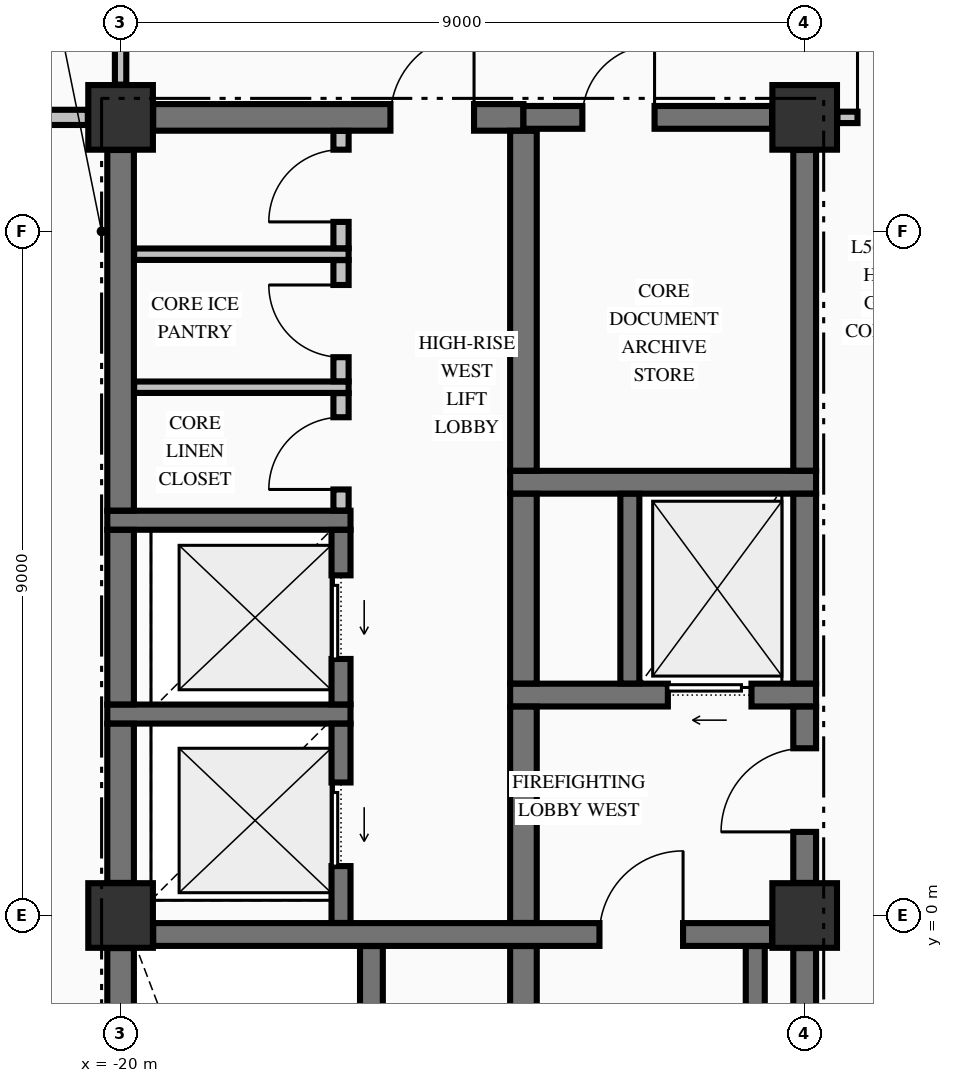
"""IFC4 building model, lengths in metres.
Left out: names, types, materials, properties, quantities, classifications, styles, units other than length and angle.
Written with IfcOpenShell. Run it as: python <this file> out.ifc"""

import sys

from ifc_helpers import new_model, si_unit, direction, frame, frame_2d, origin, origin_2d, place, context, subcontext, project, spatial, rectangle, extrude, element, fill, save


model = new_model("IFC4")
c1 = context("Model", 3, precision=1e-05, world=origin(), true_north=direction((0.0, 1.0)))
c2 = subcontext(c1, "Body", "Model", "MODEL_VIEW")
j1 = project(units=[si_unit("LENGTHUNIT", "METRE"), si_unit("PLANEANGLEUNIT", "RADIAN")], contexts=[c1])
p1 = place(None, origin())
s1 = spatial("IfcSite", under=j1, at=p1, CompositionType="ELEMENT")
p2 = place(p1, origin())
s2 = spatial("IfcBuilding", under=s1, at=p2, CompositionType="ELEMENT")
p3 = place(p2, frame((0.0, 0.0, 215.26)))
s3 = spatial("IfcBuildingStorey", under=s2, at=p3, CompositionType="ELEMENT", Elevation=215.26)
for number, where, z_axis, x_axis in (
    (1, (-20.0, 10.5, -0.25), (0.0, 0.0, 1.0), (1.0, 0.0, 0.0)),
    (2, (-11.0, 0.0, -0.25), (0.0, 0.0, 1.0), (1.0, 0.0, 0.0)),
    (3, (-11.0, 10.5, -0.25), (0.0, 0.0, 1.0), (1.0, 0.0, 0.0)),
    (4, (-20.0, 0.0, -0.25), (0.0, 0.0, 1.0), (1.0, 0.0, 0.0)),
):
    element("IfcColumn", number, at=place(p3, frame(where, z_axis=z_axis, x_axis=x_axis)), inside=s3, PredefinedType="COLUMN", context=c2, shape_type="SweptSolid", body=[
        extrude(rectangle(XDim=0.85, YDim=0.85, at=origin_2d()), origin(), (0.0, 0.0, 1.0), 3.4),
    ])
p4 = place(p3, frame((-19.571, -0.25, 0.0), z_axis=(0.0, 0.0, 1.0), x_axis=(1.0, 0.0, 0.0)))
e5 = element("IfcWall", 5, at=p4, inside=s3, PredefinedType="SHEAR", context=c2, shape_type="SweptSolid", body=[
    extrude(rectangle(XDim=8.142, YDim=0.3, at=frame_2d((4.071, 0.0))), origin(), (0.0, 0.0, 1.0), 3.15),
])
p5 = place(p4, frame((5.871, 0.0, 0.0)))
e6 = element("IfcOpeningElement", 6, at=p5, cuts=e5, PredefinedType="OPENING", context=c2, shape_type="SweptSolid", body=[
    extrude(rectangle(XDim=1.1, YDim=2.15, at=frame_2d((0.55, 1.075))), frame((0.0, 0.16, 0.0), z_axis=(0.0, -1.0, 0.0), x_axis=(1.0, 0.0, 0.0)), (0.0, 0.0, 1.0), 0.32),
])
p6 = place(p3, frame((-20.175, 2.65, 0.0), z_axis=(0.0, 0.0, 1.0), x_axis=(1.0, 0.0, 0.0)))
e7 = element("IfcWall", 7, at=p6, inside=s3, PredefinedType="SOLIDWALL", context=c2, shape_type="SweptSolid", body=[
    extrude(rectangle(XDim=3.2, YDim=0.25, at=frame_2d((1.6, 0.0))), origin(), (0.0, 0.0, 1.0), 3.15),
])
p7 = place(p3, frame((-14.875, 2.9, 0.0), z_axis=(0.0, 0.0, 1.0), x_axis=(1.0, 0.0, 0.0)))
e8 = element("IfcWall", 8, at=p7, inside=s3, PredefinedType="SHEAR", context=c2, shape_type="SweptSolid", body=[
    extrude(rectangle(XDim=4.025, YDim=0.3, at=frame_2d((2.012, 0.0))), origin(), (0.0, 0.0, 1.0), 3.15),
])
p8 = place(p7, frame((2.075, 0.0, 0.0)))
e9 = element("IfcOpeningElement", 9, at=p8, cuts=e8, PredefinedType="OPENING", context=c2, shape_type="SweptSolid", body=[
    extrude(rectangle(XDim=1.1, YDim=2.2, at=frame_2d((0.55, 1.1))), frame((0.0, 0.16, 0.0), z_axis=(0.0, -1.0, 0.0), x_axis=(1.0, 0.0, 0.0)), (0.0, 0.0, 1.0), 0.32),
])
p9 = place(p3, frame((-20.175, 5.2, 0.0), z_axis=(0.0, 0.0, 1.0), x_axis=(1.0, 0.0, 0.0)))
e10 = element("IfcWall", 10, at=p9, inside=s3, PredefinedType="SOLIDWALL", context=c2, shape_type="SweptSolid", body=[
    extrude(rectangle(XDim=3.2, YDim=0.25, at=frame_2d((1.6, 0.0))), origin(), (0.0, 0.0, 1.0), 3.15),
])
p10 = place(p3, frame((-14.875, 5.7, 0.0), z_axis=(0.0, 0.0, 1.0), x_axis=(1.0, 0.0, 0.0)))
e11 = element("IfcWall", 11, at=p10, inside=s3, PredefinedType="SHEAR", context=c2, shape_type="SweptSolid", body=[
    extrude(rectangle(XDim=4.025, YDim=0.3, at=frame_2d((2.012, 0.0))), origin(), (0.0, 0.0, 1.0), 3.15),
])
p11 = place(p3, frame((-19.571, 10.5, 0.0), z_axis=(0.0, 0.0, 1.0), x_axis=(1.0, 0.0, 0.0)))
e12 = element("IfcWall", 12, at=p11, inside=s3, PredefinedType="SHEAR", context=c2, shape_type="SweptSolid", body=[
    extrude(rectangle(XDim=4.871, YDim=0.35, at=frame_2d((2.436, 0.0))), origin(), (0.0, 0.0, 1.0), 3.15),
])
p12 = place(p11, frame((3.121, 0.0, 0.0)))
e13 = element("IfcOpeningElement", 13, at=p12, cuts=e12, PredefinedType="OPENING", context=c2, shape_type="SweptSolid", body=[
    extrude(rectangle(XDim=1.1, YDim=2.15, at=frame_2d((0.55, 1.075))), frame((0.0, 0.185, 0.0), z_axis=(0.0, -1.0, 0.0), x_axis=(1.0, 0.0, 0.0)), (0.0, 0.0, 1.0), 0.37),
])
p13 = place(p3, frame((-14.7, 10.5, 0.0), z_axis=(0.0, 0.0, 1.0), x_axis=(1.0, 0.0, 0.0)))
e14 = element("IfcWall", 14, at=p13, inside=s3, PredefinedType="SHEAR", context=c2, shape_type="SweptSolid", body=[
    extrude(rectangle(XDim=3.271, YDim=0.3, at=frame_2d((1.635, 0.0))), origin(), (0.0, 0.0, 1.0), 3.15),
])
p14 = place(p13, frame((0.775, 0.0, 0.0)))
e15 = element("IfcOpeningElement", 15, at=p14, cuts=e14, PredefinedType="OPENING", context=c2, shape_type="SweptSolid", body=[
    extrude(rectangle(XDim=0.95, YDim=2.15, at=frame_2d((0.475, 1.075))), frame((0.0, 0.16, 0.0), z_axis=(0.0, -1.0, 0.0), x_axis=(1.0, 0.0, 0.0)), (0.0, 0.0, 1.0), 0.32),
])
for number, where, z_axis, x_axis in (
    (16, (-19.822, 6.95, 0.0), (0.0, 0.0, 1.0), (1.0, 0.0, 0.0)),
    (17, (-19.822, 8.7, 0.0), (0.0, 0.0, 1.0), (1.0, 0.0, 0.0)),
):
    element("IfcWall", number, at=place(p3, frame(where, z_axis=z_axis, x_axis=x_axis)), inside=s3, PredefinedType="PARTITIONING", context=c2, shape_type="SweptSolid", body=[
        extrude(rectangle(XDim=2.822, YDim=0.15, at=frame_2d((1.411, 0.0))), origin(), (0.0, 0.0, 1.0), 3.15),
    ])
p15 = place(p3, frame((-26.835, 10.5, 0.0), z_axis=(0.0, 0.0, 1.0), x_axis=(1.0, 0.0, 0.0)))
e18 = element("IfcWall", 18, at=p15, inside=s3, PredefinedType="PARTITIONING", context=c2, shape_type="SweptSolid", body=[
    extrude(rectangle(XDim=6.404, YDim=0.2, at=frame_2d((3.202, 0.0))), origin(), (0.0, 0.0, 1.0), 3.15),
])
p16 = place(p15, frame((2.86, 0.0, 0.0)))
e19 = element("IfcOpeningElement", 19, at=p16, cuts=e18, PredefinedType="OPENING", context=c2, shape_type="SweptSolid", body=[
    extrude(rectangle(XDim=0.95, YDim=2.15, at=frame_2d((0.475, 1.075))), frame((0.0, 0.11, 0.0), z_axis=(0.0, -1.0, 0.0), x_axis=(1.0, 0.0, 0.0)), (0.0, 0.0, 1.0), 0.22),
])
p17 = place(p3, frame((-10.569, 10.5, 0.0), z_axis=(0.0, 0.0, 1.0), x_axis=(1.0, 0.0, 0.0)))
e20 = element("IfcWall", 20, at=p17, inside=s3, PredefinedType="PARTITIONING", context=c2, shape_type="SweptSolid", body=[
    extrude(rectangle(XDim=21.138, YDim=0.15, at=frame_2d((10.569, 0.0))), origin(), (0.0, 0.0, 1.0), 3.15),
])
p18 = place(p17, frame((0.264, 0.0, 0.0)))
e21 = element("IfcOpeningElement", 21, at=p18, cuts=e20, PredefinedType="OPENING", context=c2, shape_type="SweptSolid", body=[
    extrude(rectangle(XDim=1.05, YDim=2.15, at=frame_2d((0.525, 1.075))), frame((0.0, 0.085, 0.0), z_axis=(0.0, -1.0, 0.0), x_axis=(1.0, 0.0, 0.0)), (0.0, 0.0, 1.0), 0.17),
])
p19 = place(p17, frame((19.824, 0.0, 0.0)))
e22 = element("IfcOpeningElement", 22, at=p19, cuts=e20, PredefinedType="OPENING", context=c2, shape_type="SweptSolid", body=[
    extrude(rectangle(XDim=1.05, YDim=2.15, at=frame_2d((0.525, 1.075))), frame((0.0, 0.085, 0.0), z_axis=(0.0, -1.0, 0.0), x_axis=(1.0, 0.0, 0.0)), (0.0, 0.0, 1.0), 0.17),
])
p20 = place(p3, frame((-20.0, -9.521, 0.0), z_axis=(0.0, 0.0, 1.0), x_axis=(0.0, 1.0, 0.0)))
e23 = element("IfcWall", 23, at=p20, inside=s3, PredefinedType="SHEAR", context=c2, shape_type="SweptSolid", body=[
    extrude(rectangle(XDim=9.092, YDim=0.35, at=frame_2d((4.546, 0.0))), origin(), (0.0, 0.0, 1.0), 3.15),
])
p21 = place(p3, frame((-20.0, 0.429, 0.0), z_axis=(0.0, 0.0, 1.0), x_axis=(0.0, 1.0, 0.0)))
e24 = element("IfcWall", 24, at=p21, inside=s3, PredefinedType="SHEAR", context=c2, shape_type="SweptSolid", body=[
    extrude(rectangle(XDim=2.094, YDim=0.35, at=frame_2d((1.047, 0.0))), origin(), (0.0, 0.0, 1.0), 3.15),
])
p22 = place(p3, frame((-20.0, 2.777, 0.0), z_axis=(0.0, 0.0, 1.0), x_axis=(0.0, 1.0, 0.0)))
e25 = element("IfcWall", 25, at=p22, inside=s3, PredefinedType="SHEAR", context=c2, shape_type="SweptSolid", body=[
    extrude(rectangle(XDim=2.296, YDim=0.35, at=frame_2d((1.148, 0.0))), origin(), (0.0, 0.0, 1.0), 3.15),
])
p23 = place(p3, frame((-20.0, 5.327, 0.0), z_axis=(0.0, 0.0, 1.0), x_axis=(0.0, 1.0, 0.0)))
e26 = element("IfcWall", 26, at=p23, inside=s3, PredefinedType="SHEAR", context=c2, shape_type="SweptSolid", body=[
    extrude(rectangle(XDim=4.744, YDim=0.35, at=frame_2d((2.372, 0.0))), origin(), (0.0, 0.0, 1.0), 3.15),
])
p24 = place(p3, frame((-17.1, -0.098, 0.0), z_axis=(0.0, 0.0, 1.0), x_axis=(0.0, 1.0, 0.0)))
e27 = element("IfcWall", 27, at=p24, inside=s3, PredefinedType="SOLIDWALL", context=c2, shape_type="SweptSolid", body=[
    extrude(rectangle(XDim=2.621, YDim=0.25, at=frame_2d((1.311, 0.0))), origin(), (0.0, 0.0, 1.0), 3.15),
])
p25 = place(p24, frame((0.748, 0.0, 0.0)))
e28 = element("IfcOpeningElement", 28, at=p25, cuts=e27, PredefinedType="OPENING", context=c2, shape_type="SweptSolid", body=[
    extrude(rectangle(XDim=1.1, YDim=2.2, at=frame_2d((0.55, 1.1))), frame((0.0, 0.135, 0.0), z_axis=(0.0, -1.0, 0.0), x_axis=(1.0, 0.0, 0.0)), (0.0, 0.0, 1.0), 0.27),
])
p26 = place(p3, frame((-17.1, 2.777, 0.0), z_axis=(0.0, 0.0, 1.0), x_axis=(0.0, 1.0, 0.0)))
e29 = element("IfcWall", 29, at=p26, inside=s3, PredefinedType="SOLIDWALL", context=c2, shape_type="SweptSolid", body=[
    extrude(rectangle(XDim=2.296, YDim=0.25, at=frame_2d((1.148, 0.0))), origin(), (0.0, 0.0, 1.0), 3.15),
])
p27 = place(p26, frame((0.598, 0.0, 0.0)))
e30 = element("IfcOpeningElement", 30, at=p27, cuts=e29, PredefinedType="OPENING", context=c2, shape_type="SweptSolid", body=[
    extrude(rectangle(XDim=1.1, YDim=2.2, at=frame_2d((0.55, 1.1))), frame((0.0, 0.135, 0.0), z_axis=(0.0, -1.0, 0.0), x_axis=(1.0, 0.0, 0.0)), (0.0, 0.0, 1.0), 0.27),
])
p28 = place(p3, frame((-16.7, -9.773, 0.0), z_axis=(0.0, 0.0, 1.0), x_axis=(0.0, 1.0, 0.0)))
e31 = element("IfcWall", 31, at=p28, inside=s3, PredefinedType="SHEAR", context=c2, shape_type="SweptSolid", body=[
    extrude(rectangle(XDim=9.371, YDim=0.3, at=frame_2d((4.686, 0.0))), origin(), (0.0, 0.0, 1.0), 3.15),
])
p29 = place(p3, frame((-14.7, -9.773, 0.0), z_axis=(0.0, 0.0, 1.0), x_axis=(0.0, 1.0, 0.0)))
e32 = element("IfcWall", 32, at=p29, inside=s3, PredefinedType="SHEAR", context=c2, shape_type="SweptSolid", body=[
    extrude(rectangle(XDim=9.371, YDim=0.35, at=frame_2d((4.686, 0.0))), origin(), (0.0, 0.0, 1.0), 3.15),
])
p30 = place(p3, frame((-14.7, -0.098, 0.0), z_axis=(0.0, 0.0, 1.0), x_axis=(0.0, 1.0, 0.0)))
e33 = element("IfcWall", 33, at=p30, inside=s3, PredefinedType="SHEAR", context=c2, shape_type="SweptSolid", body=[
    extrude(rectangle(XDim=2.846, YDim=0.35, at=frame_2d((1.423, 0.0))), origin(), (0.0, 0.0, 1.0), 3.15),
])
p31 = place(p3, frame((-14.7, 3.052, 0.0), z_axis=(0.0, 0.0, 1.0), x_axis=(0.0, 1.0, 0.0)))
e34 = element("IfcWall", 34, at=p31, inside=s3, PredefinedType="SHEAR", context=c2, shape_type="SweptSolid", body=[
    extrude(rectangle(XDim=2.496, YDim=0.35, at=frame_2d((1.248, 0.0))), origin(), (0.0, 0.0, 1.0), 3.15),
])
p32 = place(p3, frame((-14.7, 5.852, 0.0), z_axis=(0.0, 0.0, 1.0), x_axis=(0.0, 1.0, 0.0)))
e35 = element("IfcWall", 35, at=p32, inside=s3, PredefinedType="SHEAR", context=c2, shape_type="SweptSolid", body=[
    extrude(rectangle(XDim=4.471, YDim=0.35, at=frame_2d((2.235, 0.0))), origin(), (0.0, 0.0, 1.0), 3.15),
])
p33 = place(p3, frame((-13.3, 3.052, 0.0), z_axis=(0.0, 0.0, 1.0), x_axis=(0.0, 1.0, 0.0)))
e36 = element("IfcWall", 36, at=p33, inside=s3, PredefinedType="SOLIDWALL", context=c2, shape_type="SweptSolid", body=[
    extrude(rectangle(XDim=2.496, YDim=0.25, at=frame_2d((1.248, 0.0))), origin(), (0.0, 0.0, 1.0), 3.15),
])
p34 = place(p3, frame((-11.65, -9.798, 0.0), z_axis=(0.0, 0.0, 1.0), x_axis=(0.0, 1.0, 0.0)))
e37 = element("IfcWall", 37, at=p34, inside=s3, PredefinedType="SOLIDWALL", context=c2, shape_type="SweptSolid", body=[
    extrude(rectangle(XDim=9.396, YDim=0.25, at=frame_2d((4.698, 0.0))), origin(), (0.0, 0.0, 1.0), 3.15),
])
p35 = place(p3, frame((-11.0, -9.521, 0.0), z_axis=(0.0, 0.0, 1.0), x_axis=(0.0, 1.0, 0.0)))
e38 = element("IfcWall", 38, at=p35, inside=s3, PredefinedType="SHEAR", context=c2, shape_type="SweptSolid", body=[
    extrude(rectangle(XDim=9.092, YDim=0.3, at=frame_2d((4.546, 0.0))), origin(), (0.0, 0.0, 1.0), 3.15),
])
p36 = place(p3, frame((-11.0, 0.429, 0.0), z_axis=(0.0, 0.0, 1.0), x_axis=(0.0, 1.0, 0.0)))
e39 = element("IfcWall", 39, at=p36, inside=s3, PredefinedType="SHEAR", context=c2, shape_type="SweptSolid", body=[
    extrude(rectangle(XDim=2.319, YDim=0.3, at=frame_2d((1.16, 0.0))), origin(), (0.0, 0.0, 1.0), 3.15),
])
p37 = place(p36, frame((0.671, 0.0, 0.0)))
e40 = element("IfcOpeningElement", 40, at=p37, cuts=e39, PredefinedType="OPENING", context=c2, shape_type="SweptSolid", body=[
    extrude(rectangle(XDim=1.1, YDim=2.15, at=frame_2d((0.55, 1.075))), frame((0.0, 0.16, 0.0), z_axis=(0.0, -1.0, 0.0), x_axis=(1.0, 0.0, 0.0)), (0.0, 0.0, 1.0), 0.32),
])
p38 = place(p3, frame((-11.0, 3.052, 0.0), z_axis=(0.0, 0.0, 1.0), x_axis=(0.0, 1.0, 0.0)))
e41 = element("IfcWall", 41, at=p38, inside=s3, PredefinedType="SHEAR", context=c2, shape_type="SweptSolid", body=[
    extrude(rectangle(XDim=2.496, YDim=0.3, at=frame_2d((1.248, 0.0))), origin(), (0.0, 0.0, 1.0), 3.15),
])
p39 = place(p3, frame((-11.0, 5.852, 0.0), z_axis=(0.0, 0.0, 1.0), x_axis=(0.0, 1.0, 0.0)))
e42 = element("IfcWall", 42, at=p39, inside=s3, PredefinedType="SHEAR", context=c2, shape_type="SweptSolid", body=[
    extrude(rectangle(XDim=4.219, YDim=0.3, at=frame_2d((2.109, 0.0))), origin(), (0.0, 0.0, 1.0), 3.15),
])
p40 = place(p3, frame((-20.0, 10.931, 0.0), z_axis=(0.0, 0.0, 1.0), x_axis=(0.0, 1.0, 0.0)))
e43 = element("IfcWall", 43, at=p40, inside=s3, PredefinedType="PARTITIONING", context=c2, shape_type="SweptSolid", body=[
    extrude(rectangle(XDim=2.316, YDim=0.15, at=frame_2d((1.158, 0.0))), origin(), (0.0, 0.0, 1.0), 2.342),
])
p41 = place(p40, frame((0.524, 0.0, 0.0)))
e44 = element("IfcOpeningElement", 44, at=p41, cuts=e43, PredefinedType="OPENING", context=c2, shape_type="SweptSolid", body=[
    extrude(rectangle(XDim=0.95, YDim=2.15, at=frame_2d((0.475, 1.075))), frame((0.0, 0.085, 0.0), z_axis=(0.0, -1.0, 0.0), x_axis=(1.0, 0.0, 0.0)), (0.0, 0.0, 1.0), 0.17),
])
p42 = place(p3, frame((-17.1, 5.328, 0.0), z_axis=(0.0, 0.0, 1.0), x_axis=(0.0, 1.0, 0.0)))
e45 = element("IfcWall", 45, at=p42, inside=s3, PredefinedType="PARTITIONING", context=c2, shape_type="SweptSolid", body=[
    extrude(rectangle(XDim=1.544, YDim=0.2, at=frame_2d((0.772, 0.0))), origin(), (0.0, 0.0, 1.0), 3.15),
])
p43 = place(p42, frame((0.277, 0.0, 0.0)))
e46 = element("IfcOpeningElement", 46, at=p43, cuts=e45, PredefinedType="OPENING", context=c2, shape_type="SweptSolid", body=[
    extrude(rectangle(XDim=0.95, YDim=2.15, at=frame_2d((0.475, 1.075))), frame((0.0, 0.11, 0.0), z_axis=(0.0, -1.0, 0.0), x_axis=(1.0, 0.0, 0.0)), (0.0, 0.0, 1.0), 0.22),
])
p44 = place(p3, frame((-17.1, 7.028, 0.0), z_axis=(0.0, 0.0, 1.0), x_axis=(0.0, 1.0, 0.0)))
e47 = element("IfcWall", 47, at=p44, inside=s3, PredefinedType="PARTITIONING", context=c2, shape_type="SweptSolid", body=[
    extrude(rectangle(XDim=1.594, YDim=0.2, at=frame_2d((0.797, 0.0))), origin(), (0.0, 0.0, 1.0), 3.15),
])
p45 = place(p44, frame((0.317, 0.0, 0.0)))
e48 = element("IfcOpeningElement", 48, at=p45, cuts=e47, PredefinedType="OPENING", context=c2, shape_type="SweptSolid", body=[
    extrude(rectangle(XDim=0.95, YDim=2.15, at=frame_2d((0.475, 1.075))), frame((0.0, 0.11, 0.0), z_axis=(0.0, -1.0, 0.0), x_axis=(1.0, 0.0, 0.0)), (0.0, 0.0, 1.0), 0.22),
])
p46 = place(p3, frame((-17.1, 8.778, 0.0), z_axis=(0.0, 0.0, 1.0), x_axis=(0.0, 1.0, 0.0)))
e49 = element("IfcWall", 49, at=p46, inside=s3, PredefinedType="PARTITIONING", context=c2, shape_type="SweptSolid", body=[
    extrude(rectangle(XDim=1.544, YDim=0.2, at=frame_2d((0.772, 0.0))), origin(), (0.0, 0.0, 1.0), 3.15),
])
p47 = place(p46, frame((0.347, 0.0, 0.0)))
e50 = element("IfcOpeningElement", 50, at=p47, cuts=e49, PredefinedType="OPENING", context=c2, shape_type="SweptSolid", body=[
    extrude(rectangle(XDim=0.95, YDim=2.15, at=frame_2d((0.475, 1.075))), frame((0.0, 0.11, 0.0), z_axis=(0.0, -1.0, 0.0), x_axis=(1.0, 0.0, 0.0)), (0.0, 0.0, 1.0), 0.22),
])
p48 = place(p5, origin())
e51 = element("IfcDoor", 51, at=p48, inside=s3, OperationType="SINGLE_SWING_RIGHT", PredefinedType="DOOR", context=c2, shape_type="SweptSolid", body=[
    extrude(rectangle(XDim=1.1, YDim=2.15, at=frame_2d((0.55, 1.075))), frame((0.0, 0.025, 0.0), z_axis=(0.0, -1.0, 0.0), x_axis=(1.0, 0.0, 0.0)), (0.0, 0.0, 1.0), 0.05),
])
fill(e6, e51)
p49 = place(p37, origin())
e52 = element("IfcDoor", 52, at=p49, inside=s3, OperationType="SINGLE_SWING_LEFT", PredefinedType="DOOR", context=c2, shape_type="SweptSolid", body=[
    extrude(rectangle(XDim=1.1, YDim=2.15, at=frame_2d((0.55, 1.075))), frame((0.0, 0.025, 0.0), z_axis=(0.0, -1.0, 0.0), x_axis=(1.0, 0.0, 0.0)), (0.0, 0.0, 1.0), 0.05),
])
fill(e40, e52)
p50 = place(p8, origin())
e53 = element("IfcDoor", 53, at=p50, inside=s3, OperationType="SLIDING_TO_LEFT", PredefinedType="DOOR", context=c2, shape_type="SweptSolid", body=[
    extrude(rectangle(XDim=1.1, YDim=2.2, at=frame_2d((0.55, 1.1))), frame((0.0, 0.025, 0.0), z_axis=(0.0, -1.0, 0.0), x_axis=(1.0, 0.0, 0.0)), (0.0, 0.0, 1.0), 0.05),
])
fill(e9, e53)
p51 = place(p14, origin())
e54 = element("IfcDoor", 54, at=p51, inside=s3, OperationType="SINGLE_SWING_RIGHT", PredefinedType="DOOR", context=c2, shape_type="SweptSolid", body=[
    extrude(rectangle(XDim=0.95, YDim=2.15, at=frame_2d((0.475, 1.075))), frame((0.0, 0.025, 0.0), z_axis=(0.0, -1.0, 0.0), x_axis=(1.0, 0.0, 0.0)), (0.0, 0.0, 1.0), 0.05),
])
fill(e15, e54)
p52 = place(p25, origin())
e55 = element("IfcDoor", 55, at=p52, inside=s3, OperationType="SLIDING_TO_LEFT", PredefinedType="DOOR", context=c2, shape_type="SweptSolid", body=[
    extrude(rectangle(XDim=1.1, YDim=2.2, at=frame_2d((0.55, 1.1))), frame((0.0, 0.025, 0.0), z_axis=(0.0, -1.0, 0.0), x_axis=(1.0, 0.0, 0.0)), (0.0, 0.0, 1.0), 0.05),
])
fill(e28, e55)
p53 = place(p27, origin())
e56 = element("IfcDoor", 56, at=p53, inside=s3, OperationType="SLIDING_TO_LEFT", PredefinedType="DOOR", context=c2, shape_type="SweptSolid", body=[
    extrude(rectangle(XDim=1.1, YDim=2.2, at=frame_2d((0.55, 1.1))), frame((0.0, 0.025, 0.0), z_axis=(0.0, -1.0, 0.0), x_axis=(1.0, 0.0, 0.0)), (0.0, 0.0, 1.0), 0.05),
])
fill(e30, e56)
p54 = place(p12, origin())
e57 = element("IfcDoor", 57, at=p54, inside=s3, OperationType="SINGLE_SWING_RIGHT", PredefinedType="DOOR", context=c2, shape_type="SweptSolid", body=[
    extrude(rectangle(XDim=1.1, YDim=2.15, at=frame_2d((0.55, 1.075))), frame((0.0, 0.025, 0.0), z_axis=(0.0, -1.0, 0.0), x_axis=(1.0, 0.0, 0.0)), (0.0, 0.0, 1.0), 0.05),
])
fill(e13, e57)
p55 = place(p47, origin())
e58 = element("IfcDoor", 58, at=p55, inside=s3, OperationType="SINGLE_SWING_LEFT", PredefinedType="DOOR", context=c2, shape_type="SweptSolid", body=[
    extrude(rectangle(XDim=0.95, YDim=2.15, at=frame_2d((0.475, 1.075))), frame((0.0, 0.025, 0.0), z_axis=(0.0, -1.0, 0.0), x_axis=(1.0, 0.0, 0.0)), (0.0, 0.0, 1.0), 0.05),
])
fill(e50, e58)
p56 = place(p45, origin())
e59 = element("IfcDoor", 59, at=p56, inside=s3, OperationType="SINGLE_SWING_RIGHT", PredefinedType="DOOR", context=c2, shape_type="SweptSolid", body=[
    extrude(rectangle(XDim=0.95, YDim=2.15, at=frame_2d((0.475, 1.075))), frame((0.0, 0.025, 0.0), z_axis=(0.0, -1.0, 0.0), x_axis=(1.0, 0.0, 0.0)), (0.0, 0.0, 1.0), 0.05),
])
fill(e48, e59)
p57 = place(p43, origin())
e60 = element("IfcDoor", 60, at=p57, inside=s3, OperationType="SINGLE_SWING_LEFT", PredefinedType="DOOR", context=c2, shape_type="SweptSolid", body=[
    extrude(rectangle(XDim=0.95, YDim=2.15, at=frame_2d((0.475, 1.075))), frame((0.0, 0.025, 0.0), z_axis=(0.0, -1.0, 0.0), x_axis=(1.0, 0.0, 0.0)), (0.0, 0.0, 1.0), 0.05),
])
fill(e46, e60)
p58 = place(p18, origin())
e61 = element("IfcDoor", 61, at=p58, inside=s3, OperationType="SINGLE_SWING_LEFT", PredefinedType="DOOR", context=c2, shape_type="SweptSolid", body=[
    extrude(rectangle(XDim=1.05, YDim=2.15, at=frame_2d((0.525, 1.075))), frame((0.0, 0.025, 0.0), z_axis=(0.0, -1.0, 0.0), x_axis=(1.0, 0.0, 0.0)), (0.0, 0.0, 1.0), 0.05),
])
fill(e21, e61)
save(model, sys.argv[1])
